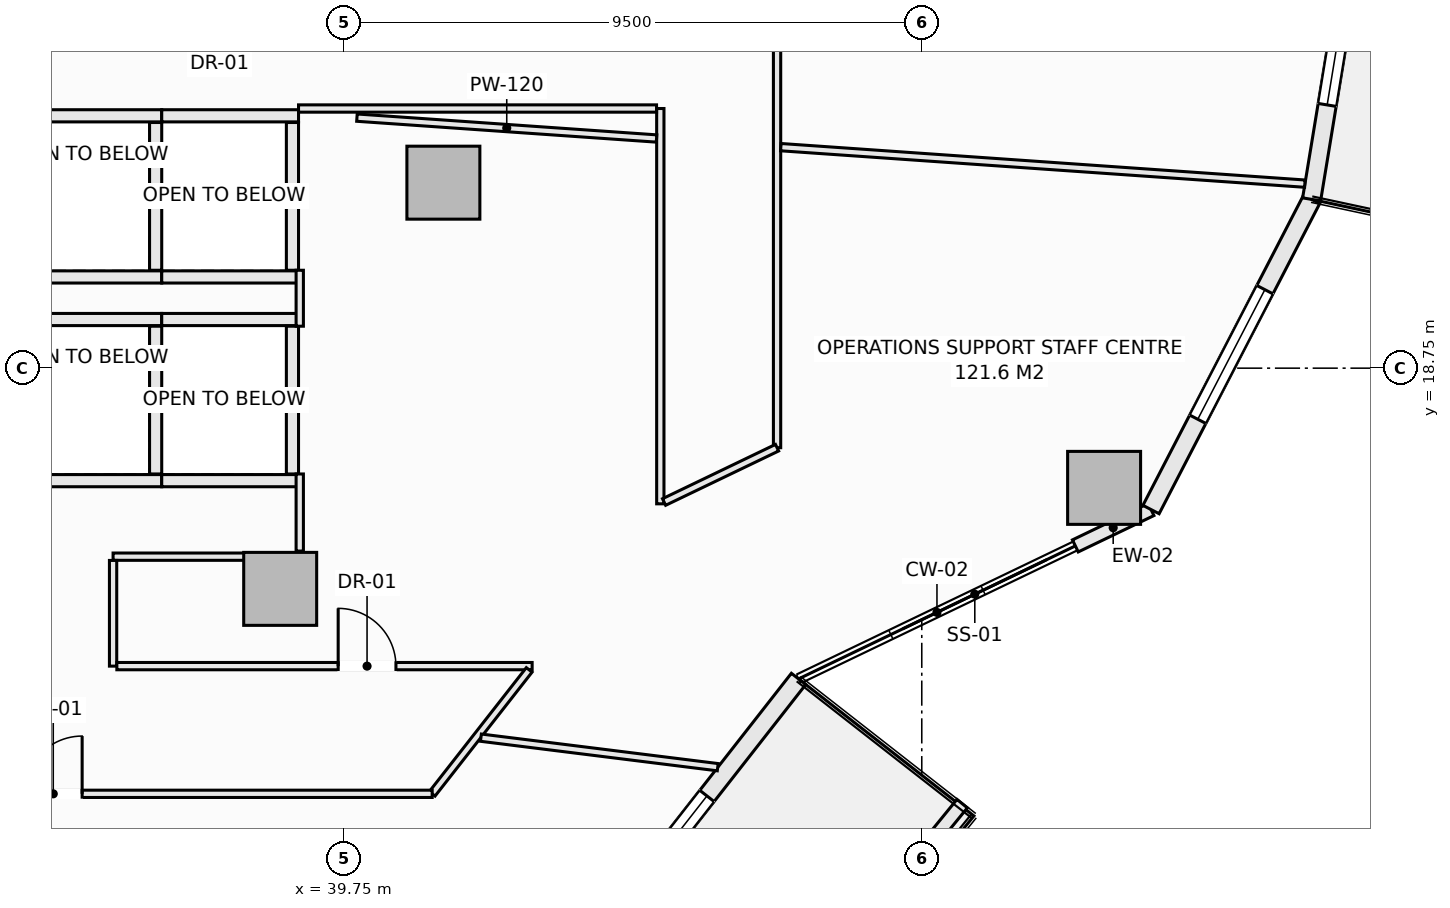
"""IFC4 building model, lengths in metres.
Left out: names, types, materials, properties, quantities, classifications, styles, units other than length and angle.
Written with IfcOpenShell. Run it as: python <this file> out.ifc"""

import sys

from ifc_helpers import new_model, si_unit, direction, frame, frame_2d, origin, origin_2d, place, context, subcontext, project, spatial, rectangle, extrude, element, fill, save


model = new_model("IFC4")
c1 = context("Model", 3, precision=1e-05, world=origin(), true_north=direction((0.0, 1.0)))
c2 = subcontext(c1, "Body", "Model", "MODEL_VIEW")
j1 = project(units=[si_unit("LENGTHUNIT", "METRE"), si_unit("PLANEANGLEUNIT", "RADIAN")], contexts=[c1])
p1 = place(None, origin())
s1 = spatial("IfcSite", under=j1, at=p1, CompositionType="ELEMENT")
p2 = place(p1, origin())
s2 = spatial("IfcBuilding", under=s1, at=p2, CompositionType="ELEMENT")
p3 = place(p2, frame((0.0, 0.0, 76.55)))
s3 = spatial("IfcBuildingStorey", under=s2, at=p3, CompositionType="ELEMENT", Elevation=76.55)
for number, where, z_axis, x_axis in (
    (1, (52.249, 16.781, -0.28), (0.0, 0.0, 1.0), (1.0, 0.0, 0.0)),
    (2, (38.698, 15.121, -0.28), (0.0, 0.0, 1.0), (1.0, 0.0, 0.0)),
    (3, (41.382, 21.801, -0.28), (0.0, 0.0, 1.0), (1.0, 0.0, 0.0)),
):
    element("IfcColumn", number, at=place(p3, frame(where, z_axis=z_axis, x_axis=x_axis)), inside=s3, PredefinedType="COLUMN", context=c2, shape_type="SweptSolid", body=[
        extrude(rectangle(XDim=1.2, YDim=1.2, at=origin_2d()), origin(), (0.0, 0.0, 1.0), 3.85),
    ])
p4 = place(p3, frame((43.344, 8.684, 0.0), z_axis=(0.0, 0.0, 1.0), x_axis=(0.616434798832, 0.78740595552, 0.0)))
e4 = element("IfcWall", 4, at=p4, inside=s3, PredefinedType="SOLIDWALL", context=c2, shape_type="SweptSolid", body=[
    extrude(rectangle(XDim=6.294, YDim=0.3, at=frame_2d((3.147, 0.0))), origin(), (0.0, 0.0, 1.0), 3.093),
])
p5 = place(p4, frame((1.45, 0.0, 0.85)))
e5 = element("IfcOpeningElement", 5, at=p5, cuts=e4, PredefinedType="OPENING", context=c2, shape_type="SweptSolid", body=[
    extrude(rectangle(XDim=2.4, YDim=1.9, at=frame_2d((1.2, 0.95))), frame((0.0, 0.16, 0.0), z_axis=(0.0, -1.0, 0.0), x_axis=(1.0, 0.0, 0.0)), (0.0, 0.0, 1.0), 0.32),
])
p6 = place(p3, frame((51.776, 15.827, 0.0), z_axis=(0.0, 0.0, 1.0), x_axis=(0.90131879969, 0.433156347438, 0.0)))
e6 = element("IfcWall", 6, at=p6, inside=s3, PredefinedType="SOLIDWALL", context=c2, shape_type="SweptSolid", body=[
    extrude(rectangle(XDim=1.381, YDim=0.22, at=frame_2d((0.69, 0.0))), origin(), (0.0, 0.0, 1.0), 3.093),
])
p7 = place(p3, frame((53.021, 16.425, 0.0), z_axis=(0.0, 0.0, 1.0), x_axis=(0.459800981414, 0.888021991558, 0.0)))
e7 = element("IfcWall", 7, at=p7, inside=s3, PredefinedType="SOLIDWALL", context=c2, shape_type="SweptSolid", body=[
    extrude(rectangle(XDim=5.744, YDim=0.3, at=frame_2d((2.872, 0.0))), origin(), (0.0, 0.0, 1.0), 3.093),
])
p8 = place(p7, frame((1.672, 0.0, 0.85)))
e8 = element("IfcOpeningElement", 8, at=p8, cuts=e7, PredefinedType="OPENING", context=c2, shape_type="SweptSolid", body=[
    extrude(rectangle(XDim=2.4, YDim=1.9, at=frame_2d((1.2, 0.95))), frame((0.0, 0.16, 0.0), z_axis=(0.0, -1.0, 0.0), x_axis=(1.0, 0.0, 0.0)), (0.0, 0.0, 1.0), 0.32),
])
p9 = place(p3, frame((55.662, 21.526, 0.0), z_axis=(0.0, 0.0, 1.0), x_axis=(0.162386212206, 0.986727276447, 0.0)))
e9 = element("IfcWall", 9, at=p9, inside=s3, PredefinedType="SOLIDWALL", context=c2, shape_type="SweptSolid", body=[
    extrude(rectangle(XDim=5.548, YDim=0.3, at=frame_2d((2.774, 0.0))), origin(), (0.0, 0.0, 1.0), 3.093),
])
p10 = place(p9, frame((1.574, 0.0, 0.85)))
e10 = element("IfcOpeningElement", 10, at=p10, cuts=e9, PredefinedType="OPENING", context=c2, shape_type="SweptSolid", body=[
    extrude(rectangle(XDim=2.4, YDim=1.9, at=frame_2d((1.2, 0.95))), frame((0.0, 0.16, 0.0), z_axis=(0.0, -1.0, 0.0), x_axis=(1.0, 0.0, 0.0)), (0.0, 0.0, 1.0), 0.32),
])
p11 = place(p3, frame((45.292, 5.918, 0.0), z_axis=(0.0, 0.0, 1.0), x_axis=(0.631819273026, 0.775115737315, 0.0)))
e11 = element("IfcWall", 11, at=p11, inside=s3, PredefinedType="PARAPET", context=c2, shape_type="SweptSolid", body=[
    extrude(rectangle(XDim=7.316, YDim=0.22, at=frame_2d((3.658, 0.0))), origin(), (0.0, 0.0, 1.0), 0.52),
])
for number, where, z_axis, x_axis in (
    (12, (34.5, 19.55, 0.0), (0.0, 0.0, 1.0), (1.0, 0.0, 0.0)),
    (13, (34.5, 16.9, 0.0), (0.0, 0.0, 1.0), (1.0, 0.0, 0.0)),
):
    element("IfcWall", number, at=place(p3, frame(where, z_axis=z_axis, x_axis=x_axis)), inside=s3, PredefinedType="SOLIDWALL", context=c2, shape_type="SweptSolid", body=[
        extrude(rectangle(XDim=2.25, YDim=0.2, at=frame_2d((1.125, 0.0))), origin(), (0.0, 0.0, 1.0), 3.57),
    ])
p12 = place(p3, frame((36.65, 17.01, 0.0), z_axis=(0.0, 0.0, 1.0), x_axis=(0.0, 1.0, 0.0)))
e14 = element("IfcWall", 14, at=p12, inside=s3, PredefinedType="SOLIDWALL", context=c2, shape_type="SweptSolid", body=[
    extrude(rectangle(XDim=2.43, YDim=0.2, at=frame_2d((1.215, 0.0))), origin(), (0.0, 0.0, 1.0), 3.57),
])
for number, where, z_axis, x_axis in (
    (15, (36.75, 19.55, 0.0), (0.0, 0.0, 1.0), (1.0, 0.0, 0.0)),
    (16, (36.75, 16.9, 0.0), (0.0, 0.0, 1.0), (1.0, 0.0, 0.0)),
):
    element("IfcWall", number, at=place(p3, frame(where, z_axis=z_axis, x_axis=x_axis)), inside=s3, PredefinedType="SOLIDWALL", context=c2, shape_type="SweptSolid", body=[
        extrude(rectangle(XDim=2.25, YDim=0.2, at=frame_2d((1.125, 0.0))), origin(), (0.0, 0.0, 1.0), 3.57),
    ])
p13 = place(p3, frame((38.9, 17.01, 0.0), z_axis=(0.0, 0.0, 1.0), x_axis=(0.0, 1.0, 0.0)))
e17 = element("IfcWall", 17, at=p13, inside=s3, PredefinedType="SOLIDWALL", context=c2, shape_type="SweptSolid", body=[
    extrude(rectangle(XDim=2.43, YDim=0.2, at=frame_2d((1.215, 0.0))), origin(), (0.0, 0.0, 1.0), 3.57),
])
for number, where, z_axis, x_axis in (
    (18, (34.5, 22.9, 0.0), (0.0, 0.0, 1.0), (1.0, 0.0, 0.0)),
    (19, (34.5, 20.25, 0.0), (0.0, 0.0, 1.0), (1.0, 0.0, 0.0)),
):
    element("IfcWall", number, at=place(p3, frame(where, z_axis=z_axis, x_axis=x_axis)), inside=s3, PredefinedType="SOLIDWALL", context=c2, shape_type="SweptSolid", body=[
        extrude(rectangle(XDim=2.25, YDim=0.2, at=frame_2d((1.125, 0.0))), origin(), (0.0, 0.0, 1.0), 3.57),
    ])
p14 = place(p3, frame((36.65, 20.36, 0.0), z_axis=(0.0, 0.0, 1.0), x_axis=(0.0, 1.0, 0.0)))
e20 = element("IfcWall", 20, at=p14, inside=s3, PredefinedType="SOLIDWALL", context=c2, shape_type="SweptSolid", body=[
    extrude(rectangle(XDim=2.43, YDim=0.2, at=frame_2d((1.215, 0.0))), origin(), (0.0, 0.0, 1.0), 3.57),
])
for number, where, z_axis, x_axis in (
    (21, (36.75, 22.9, 0.0), (0.0, 0.0, 1.0), (1.0, 0.0, 0.0)),
    (22, (36.75, 20.25, 0.0), (0.0, 0.0, 1.0), (1.0, 0.0, 0.0)),
):
    element("IfcWall", number, at=place(p3, frame(where, z_axis=z_axis, x_axis=x_axis)), inside=s3, PredefinedType="SOLIDWALL", context=c2, shape_type="SweptSolid", body=[
        extrude(rectangle(XDim=2.25, YDim=0.2, at=frame_2d((1.125, 0.0))), origin(), (0.0, 0.0, 1.0), 3.57),
    ])
p15 = place(p3, frame((38.9, 20.36, 0.0), z_axis=(0.0, 0.0, 1.0), x_axis=(0.0, 1.0, 0.0)))
e23 = element("IfcWall", 23, at=p15, inside=s3, PredefinedType="SOLIDWALL", context=c2, shape_type="SweptSolid", body=[
    extrude(rectangle(XDim=2.43, YDim=0.2, at=frame_2d((1.215, 0.0))), origin(), (0.0, 0.0, 1.0), 3.57),
])
p16 = place(p3, frame((35.95, 15.65, 0.0), z_axis=(0.0, 0.0, 1.0), x_axis=(1.0, 0.0, 0.0)))
e24 = element("IfcWall", 24, at=p16, inside=s3, PredefinedType="PARTITIONING", context=c2, shape_type="SweptSolid", body=[
    extrude(rectangle(XDim=2.291, YDim=0.12, at=frame_2d((1.146, 0.0))), origin(), (0.0, 0.0, 1.0), 3.57),
])
p17 = place(p3, frame((35.95, 13.85, 0.0), z_axis=(0.0, 0.0, 1.0), x_axis=(0.0, 1.0, 0.0)))
e25 = element("IfcWall", 25, at=p17, inside=s3, PredefinedType="PARTITIONING", context=c2, shape_type="SweptSolid", body=[
    extrude(rectangle(XDim=1.738, YDim=0.12, at=frame_2d((0.869, 0.0))), origin(), (0.0, 0.0, 1.0), 3.57),
])
p18 = place(p3, frame((36.012, 13.85, 0.0), z_axis=(0.0, 0.0, 1.0), x_axis=(1.0, 0.0, 0.0)))
e26 = element("IfcWall", 26, at=p18, inside=s3, PredefinedType="PARTITIONING", context=c2, shape_type="SweptSolid", body=[
    extrude(rectangle(XDim=6.83, YDim=0.12, at=frame_2d((3.415, 0.0))), origin(), (0.0, 0.0, 1.0), 3.57),
])
p19 = place(p18, frame((3.64, 0.0, 0.0)))
e27 = element("IfcOpeningElement", 27, at=p19, cuts=e26, PredefinedType="OPENING", context=c2, shape_type="SweptSolid", body=[
    extrude(rectangle(XDim=0.95, YDim=2.1, at=frame_2d((0.475, 1.05))), frame((0.0, 0.07, 0.0), z_axis=(0.0, -1.0, 0.0), x_axis=(1.0, 0.0, 0.0)), (0.0, 0.0, 1.0), 0.14),
])
p20 = place(p3, frame((41.198, 11.75, 0.0), z_axis=(0.0, 0.0, 1.0), x_axis=(0.616412533256, 0.787423386016, 0.0)))
e28 = element("IfcWall", 28, at=p20, inside=s3, PredefinedType="PARTITIONING", context=c2, shape_type="SweptSolid", body=[
    extrude(rectangle(XDim=2.588, YDim=0.12, at=frame_2d((1.294, 0.0))), origin(), (0.0, 0.0, 1.0), 3.57),
])
p21 = place(p3, frame((23.4, 11.75, 0.0), z_axis=(0.0, 0.0, 1.0), x_axis=(1.0, 0.0, 0.0)))
e29 = element("IfcWall", 29, at=p21, inside=s3, PredefinedType="PARTITIONING", context=c2, shape_type="SweptSolid", body=[
    extrude(rectangle(XDim=17.798, YDim=0.12, at=frame_2d((8.899, 0.0))), origin(), (0.0, 0.0, 1.0), 3.57),
])
p22 = place(p21, frame((3.094, 0.0, 0.0)))
e30 = element("IfcOpeningElement", 30, at=p22, cuts=e29, PredefinedType="OPENING", context=c2, shape_type="SweptSolid", body=[
    extrude(rectangle(XDim=0.95, YDim=2.1, at=frame_2d((0.475, 1.05))), frame((0.0, 0.07, 0.0), z_axis=(0.0, -1.0, 0.0), x_axis=(1.0, 0.0, 0.0)), (0.0, 0.0, 1.0), 0.14),
])
p23 = place(p21, frame((11.091, 0.0, 0.0)))
e31 = element("IfcOpeningElement", 31, at=p23, cuts=e29, PredefinedType="OPENING", context=c2, shape_type="SweptSolid", body=[
    extrude(rectangle(XDim=0.95, YDim=2.1, at=frame_2d((0.475, 1.05))), frame((0.0, 0.07, 0.0), z_axis=(0.0, -1.0, 0.0), x_axis=(1.0, 0.0, 0.0)), (0.0, 0.0, 1.0), 0.14),
])
p24 = place(p3, frame((44.95, 16.519, 0.0), z_axis=(0.0, 0.0, 1.0), x_axis=(0.0, 1.0, 0.0)))
e32 = element("IfcWall", 32, at=p24, inside=s3, PredefinedType="PARTITIONING", context=c2, shape_type="SweptSolid", body=[
    extrude(rectangle(XDim=6.501, YDim=0.12, at=frame_2d((3.25, 0.0))), origin(), (0.0, 0.0, 1.0), 3.57),
])
p25 = place(p3, frame((46.87, 17.442, 0.0), z_axis=(0.0, 0.0, 1.0), x_axis=(0.0, 1.0, 0.0)))
e33 = element("IfcWall", 33, at=p25, inside=s3, PredefinedType="PARTITIONING", context=c2, shape_type="SweptSolid", body=[
    extrude(rectangle(XDim=19.116, YDim=0.12, at=frame_2d((9.558, 0.0))), origin(), (0.0, 0.0, 1.0), 3.57),
])
p26 = place(p25, frame((11.352, 0.0, 0.0)))
e34 = element("IfcOpeningElement", 34, at=p26, cuts=e33, PredefinedType="OPENING", context=c2, shape_type="SweptSolid", body=[
    extrude(rectangle(XDim=0.95, YDim=2.1, at=frame_2d((0.475, 1.05))), frame((0.0, 0.07, 0.0), z_axis=(0.0, -1.0, 0.0), x_axis=(1.0, 0.0, 0.0)), (0.0, 0.0, 1.0), 0.14),
])
p27 = place(p3, frame((45.012, 16.549, 0.0), z_axis=(0.0, 0.0, 1.0), x_axis=(0.901304887575, 0.433185294803, 0.0)))
e35 = element("IfcWall", 35, at=p27, inside=s3, PredefinedType="PARTITIONING", context=c2, shape_type="SweptSolid", body=[
    extrude(rectangle(XDim=2.062, YDim=0.12, at=frame_2d((1.031, 0.0))), origin(), (0.0, 0.0, 1.0), 3.57),
])
p28 = place(p3, frame((39.0, 23.02, 0.0), z_axis=(0.0, 0.0, 1.0), x_axis=(1.0, 0.0, 0.0)))
e36 = element("IfcWall", 36, at=p28, inside=s3, PredefinedType="PARTITIONING", context=c2, shape_type="SweptSolid", body=[
    extrude(rectangle(XDim=5.888, YDim=0.12, at=frame_2d((2.944, 0.0))), origin(), (0.0, 0.0, 1.0), 3.57),
])
p29 = place(p3, frame((39.02, 15.742, 0.0), z_axis=(0.0, 0.0, 1.0), x_axis=(0.0, 1.0, 0.0)))
e37 = element("IfcWall", 37, at=p29, inside=s3, PredefinedType="PARTITIONING", context=c2, shape_type="SweptSolid", body=[
    extrude(rectangle(XDim=1.268, YDim=0.12, at=frame_2d((0.634, 0.0))), origin(), (0.0, 0.0, 1.0), 2.934),
])
p30 = place(p3, frame((39.02, 19.44, 0.0), z_axis=(0.0, 0.0, 1.0), x_axis=(0.0, 1.0, 0.0)))
e38 = element("IfcWall", 38, at=p30, inside=s3, PredefinedType="PARTITIONING", context=c2, shape_type="SweptSolid", body=[
    extrude(rectangle(XDim=0.92, YDim=0.12, at=frame_2d((0.46, 0.0))), origin(), (0.0, 0.0, 1.0), 3.57),
])
p31 = place(p3, frame((39.961, 22.87, 0.0), z_axis=(0.0, 0.0, 1.0), x_axis=(0.99758211908, -0.069497594858, 0.0)))
e39 = element("IfcWall", 39, at=p31, inside=s3, PredefinedType="PARTITIONING", context=c2, shape_type="SweptSolid", body=[
    extrude(rectangle(XDim=4.939, YDim=0.12, at=frame_2d((2.47, 0.0))), origin(), (0.0, 0.0, 1.0), 3.57),
])
p32 = place(p3, frame((46.932, 22.385, 0.0), z_axis=(0.0, 0.0, 1.0), x_axis=(0.997586585682, -0.069433450639, 0.0)))
e40 = element("IfcWall", 40, at=p32, inside=s3, PredefinedType="PARTITIONING", context=c2, shape_type="SweptSolid", body=[
    extrude(rectangle(XDim=8.639, YDim=0.12, at=frame_2d((4.32, 0.0))), origin(), (0.0, 0.0, 1.0), 3.205),
])
p33 = place(p3, frame((42.0, 12.674, 0.0), z_axis=(0.0, 0.0, 1.0), x_axis=(0.992316110302, -0.123728481908, 0.0)))
e41 = element("IfcWall", 41, at=p33, inside=s3, PredefinedType="PARTITIONING", context=c2, shape_type="SweptSolid", body=[
    extrude(rectangle(XDim=3.925, YDim=0.12, at=frame_2d((1.962, 0.0))), origin(), (0.0, 0.0, 1.0), 3.57),
])
p34 = place(p3, frame((29.818, 11.688, 0.0), z_axis=(0.0, 0.0, 1.0), x_axis=(0.944668147769, -0.328027575961, 0.0)))
e42 = element("IfcWall", 42, at=p34, inside=s3, PredefinedType="PARTITIONING", context=c2, shape_type="SweptSolid", body=[
    extrude(rectangle(XDim=11.428, YDim=0.12, at=frame_2d((5.714, 0.0))), origin(), (0.0, 0.0, 1.0), 3.093),
])
p35 = place(p5, origin())
e43 = element("IfcWindow", 43, at=p35, inside=s3, PartitioningType="SINGLE_PANEL", PredefinedType="WINDOW", context=c2, shape_type="SweptSolid", body=[
    extrude(rectangle(XDim=2.4, YDim=1.9, at=frame_2d((1.2, 0.95))), frame((0.0, 0.03, 0.0), z_axis=(0.0, -1.0, 0.0), x_axis=(1.0, 0.0, 0.0)), (0.0, 0.0, 1.0), 0.06),
])
fill(e5, e43)
p36 = place(p8, origin())
e44 = element("IfcWindow", 44, at=p36, inside=s3, PartitioningType="SINGLE_PANEL", PredefinedType="WINDOW", context=c2, shape_type="SweptSolid", body=[
    extrude(rectangle(XDim=2.4, YDim=1.9, at=frame_2d((1.2, 0.95))), frame((0.0, 0.03, 0.0), z_axis=(0.0, -1.0, 0.0), x_axis=(1.0, 0.0, 0.0)), (0.0, 0.0, 1.0), 0.06),
])
fill(e8, e44)
p37 = place(p10, origin())
e45 = element("IfcWindow", 45, at=p37, inside=s3, PartitioningType="SINGLE_PANEL", PredefinedType="WINDOW", context=c2, shape_type="SweptSolid", body=[
    extrude(rectangle(XDim=2.4, YDim=1.9, at=frame_2d((1.2, 0.95))), frame((0.0, 0.03, 0.0), z_axis=(0.0, -1.0, 0.0), x_axis=(1.0, 0.0, 0.0)), (0.0, 0.0, 1.0), 0.06),
])
fill(e10, e45)
p38 = place(p23, origin())
e46 = element("IfcDoor", 46, at=p38, inside=s3, OperationType="SINGLE_SWING_RIGHT", PredefinedType="DOOR", context=c2, shape_type="SweptSolid", body=[
    extrude(rectangle(XDim=0.95, YDim=2.1, at=frame_2d((0.475, 1.05))), frame((0.0, 0.025, 0.0), z_axis=(0.0, -1.0, 0.0), x_axis=(1.0, 0.0, 0.0)), (0.0, 0.0, 1.0), 0.05),
])
fill(e31, e46)
p39 = place(p19, origin())
e47 = element("IfcDoor", 47, at=p39, inside=s3, OperationType="SINGLE_SWING_LEFT", PredefinedType="DOOR", context=c2, shape_type="SweptSolid", body=[
    extrude(rectangle(XDim=0.95, YDim=2.1, at=frame_2d((0.475, 1.05))), frame((0.0, 0.025, 0.0), z_axis=(0.0, -1.0, 0.0), x_axis=(1.0, 0.0, 0.0)), (0.0, 0.0, 1.0), 0.05),
])
fill(e27, e47)
save(model, sys.argv[1])
